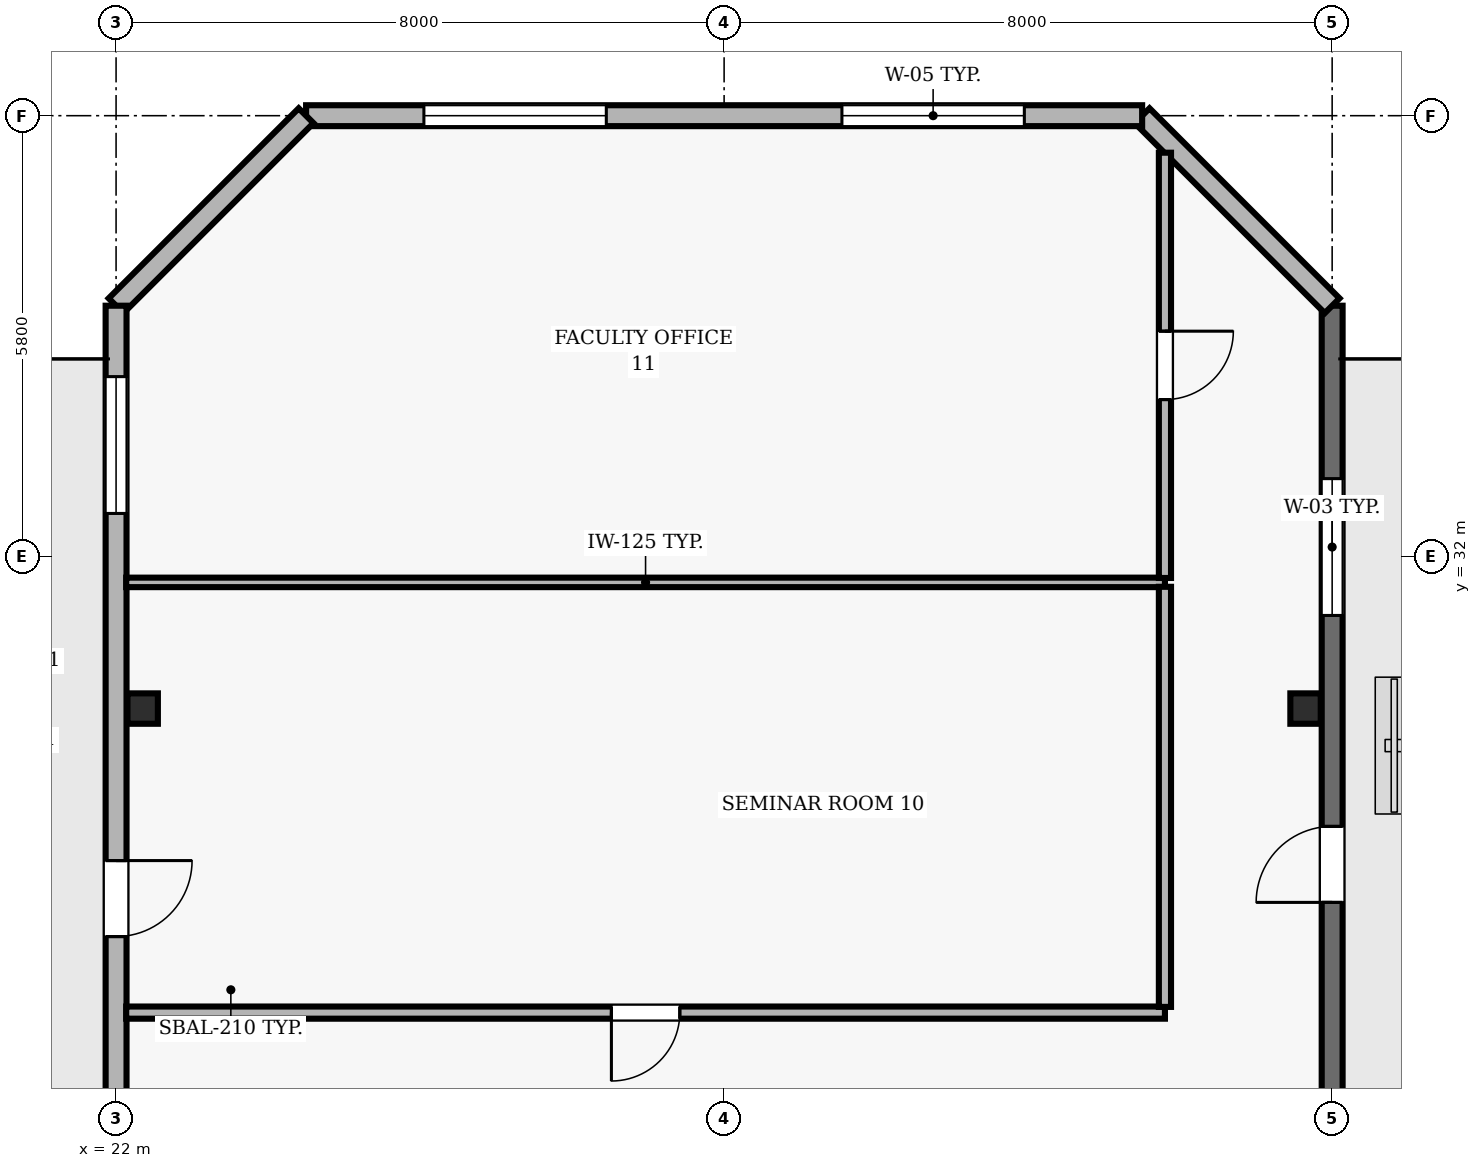
"""IFC4 building model, lengths in metres.
Left out: names, types, materials, properties, quantities, classifications, styles, units other than length and angle.
Written with IfcOpenShell. Run it as: python <this file> out.ifc"""

import sys

from ifc_helpers import new_model, si_unit, direction, frame, frame_2d, origin, origin_2d, place, context, subcontext, project, spatial, rectangle, hollow_rectangle, extrude, element, fill, save


model = new_model("IFC4")
c1 = context("Model", 3, precision=1e-05, world=origin(), true_north=direction((0.0, 1.0)))
c2 = subcontext(c1, "Body", "Model", "MODEL_VIEW")
j1 = project(units=[si_unit("LENGTHUNIT", "METRE"), si_unit("PLANEANGLEUNIT", "RADIAN")], contexts=[c1])
p1 = place(None, origin())
s1 = spatial("IfcSite", under=j1, at=p1, CompositionType="ELEMENT")
p2 = place(p1, origin())
s2 = spatial("IfcBuilding", under=s1, at=p2, CompositionType="ELEMENT")
p3 = place(p2, frame((0.0, 0.0, 271.6)))
s3 = spatial("IfcBuildingStorey", under=s2, at=p3, CompositionType="ELEMENT", Elevation=271.6)
for number, where, z_axis, x_axis in (
    (1, (22.35, 30.0, 0.0), (0.0, 0.0, 1.0), (1.0, 0.0, 0.0)),
    (2, (37.65, 30.0, 0.0), (0.0, 0.0, 1.0), (1.0, 0.0, 0.0)),
):
    element("IfcColumn", number, at=place(p3, frame(where, z_axis=z_axis, x_axis=x_axis)), inside=s3, PredefinedType="COLUMN", context=c2, shape_type="SweptSolid", body=[
        extrude(hollow_rectangle(XDim=0.4, YDim=0.4, WallThickness=0.02, at=origin_2d()), origin(), (0.0, 0.0, 1.0), 3.9),
    ])
p4 = place(p3, frame((38.0, 22.6, 0.0), z_axis=(0.0, 0.0, 1.0), x_axis=(0.0, 1.0, 0.0)))
e3 = element("IfcWall", 3, at=p4, inside=s3, PredefinedType="SOLIDWALL", context=c2, shape_type="SweptSolid", body=[
    extrude(rectangle(XDim=12.7, YDim=0.275, at=frame_2d((6.35, 0.0))), origin(), (0.0, 0.0, 1.0), 3.69),
])
p5 = place(p4, frame((4.85, 0.0, 0.0)))
e4 = element("IfcOpeningElement", 4, at=p5, cuts=e3, PredefinedType="OPENING", context=c2, shape_type="SweptSolid", body=[
    extrude(rectangle(XDim=1.0, YDim=2.2, at=frame_2d((0.5, 1.1))), frame((0.0, 0.147, 0.0), z_axis=(0.0, -1.0, 0.0), x_axis=(1.0, 0.0, 0.0)), (0.0, 0.0, 1.0), 0.295),
])
p6 = place(p4, frame((8.625, 0.0, 0.9)))
e5 = element("IfcOpeningElement", 5, at=p6, cuts=e3, PredefinedType="OPENING", context=c2, shape_type="SweptSolid", body=[
    extrude(rectangle(XDim=1.8, YDim=1.6, at=frame_2d((0.9, 0.8))), frame((0.0, 0.147, 0.0), z_axis=(0.0, -1.0, 0.0), x_axis=(1.0, 0.0, 0.0)), (0.0, 0.0, 1.0), 0.295),
])
p7 = place(p3, frame((38.0, 35.3, 0.0), z_axis=(0.0, 0.0, 1.0), x_axis=(-0.707106781187, 0.707106781187, 0.0)))
e6 = element("IfcWall", 6, at=p7, inside=s3, PredefinedType="SOLIDWALL", context=c2, shape_type="SweptSolid", body=[
    extrude(rectangle(XDim=3.536, YDim=0.275, at=frame_2d((1.768, 0.0))), origin(), (0.0, 0.0, 1.0), 3.69),
])
p8 = place(p3, frame((35.5, 37.8, 0.0), z_axis=(0.0, 0.0, 1.0), x_axis=(-1.0, 0.0, 0.0)))
e7 = element("IfcWall", 7, at=p8, inside=s3, PredefinedType="SOLIDWALL", context=c2, shape_type="SweptSolid", body=[
    extrude(rectangle(XDim=11.0, YDim=0.275, at=frame_2d((5.5, 0.0))), origin(), (0.0, 0.0, 1.0), 3.69),
])
p9 = place(p8, frame((1.55, 0.0, 0.9)))
e8 = element("IfcOpeningElement", 8, at=p9, cuts=e7, PredefinedType="OPENING", context=c2, shape_type="SweptSolid", body=[
    extrude(rectangle(XDim=2.4, YDim=1.6, at=frame_2d((1.2, 0.8))), frame((0.0, 0.147, 0.0), z_axis=(0.0, -1.0, 0.0), x_axis=(1.0, 0.0, 0.0)), (0.0, 0.0, 1.0), 0.295),
])
p10 = place(p8, frame((7.05, 0.0, 0.9)))
e9 = element("IfcOpeningElement", 9, at=p10, cuts=e7, PredefinedType="OPENING", context=c2, shape_type="SweptSolid", body=[
    extrude(rectangle(XDim=2.4, YDim=1.6, at=frame_2d((1.2, 0.8))), frame((0.0, 0.147, 0.0), z_axis=(0.0, -1.0, 0.0), x_axis=(1.0, 0.0, 0.0)), (0.0, 0.0, 1.0), 0.295),
])
p11 = place(p3, frame((24.5, 37.8, 0.0), z_axis=(0.0, 0.0, 1.0), x_axis=(-0.707106781187, -0.707106781187, 0.0)))
e10 = element("IfcWall", 10, at=p11, inside=s3, PredefinedType="SOLIDWALL", context=c2, shape_type="SweptSolid", body=[
    extrude(rectangle(XDim=3.536, YDim=0.275, at=frame_2d((1.768, 0.0))), origin(), (0.0, 0.0, 1.0), 3.69),
])
p12 = place(p3, frame((22.0, 35.3, 0.0), z_axis=(0.0, 0.0, 1.0), x_axis=(0.0, -1.0, 0.0)))
e11 = element("IfcWall", 11, at=p12, inside=s3, PredefinedType="SOLIDWALL", context=c2, shape_type="SweptSolid", body=[
    extrude(rectangle(XDim=32.8, YDim=0.275, at=frame_2d((16.4, 0.0))), origin(), (0.0, 0.0, 1.0), 3.69),
])
p13 = place(p12, frame((7.3, 0.0, 0.0)))
e12 = element("IfcOpeningElement", 12, at=p13, cuts=e11, PredefinedType="OPENING", context=c2, shape_type="SweptSolid", body=[
    extrude(rectangle(XDim=1.0, YDim=2.2, at=frame_2d((0.5, 1.1))), frame((0.0, 0.147, 0.0), z_axis=(0.0, -1.0, 0.0), x_axis=(1.0, 0.0, 0.0)), (0.0, 0.0, 1.0), 0.295),
])
p14 = place(p12, frame((0.933, 0.0, 0.9)))
e13 = element("IfcOpeningElement", 13, at=p14, cuts=e11, PredefinedType="OPENING", context=c2, shape_type="SweptSolid", body=[
    extrude(rectangle(XDim=1.8, YDim=1.8, at=frame_2d((0.9, 0.9))), frame((0.0, 0.147, 0.0), z_axis=(0.0, -1.0, 0.0), x_axis=(1.0, 0.0, 0.0)), (0.0, 0.0, 1.0), 0.295),
])
p15 = place(p12, frame((12.767, 0.0, 0.9)))
e14 = element("IfcOpeningElement", 14, at=p15, cuts=e11, PredefinedType="OPENING", context=c2, shape_type="SweptSolid", body=[
    extrude(rectangle(XDim=1.8, YDim=1.8, at=frame_2d((0.9, 0.9))), frame((0.0, 0.147, 0.0), z_axis=(0.0, -1.0, 0.0), x_axis=(1.0, 0.0, 0.0)), (0.0, 0.0, 1.0), 0.295),
])
p16 = place(p12, frame((18.233, 0.0, 0.9)))
e15 = element("IfcOpeningElement", 15, at=p16, cuts=e11, PredefinedType="OPENING", context=c2, shape_type="SweptSolid", body=[
    extrude(rectangle(XDim=1.8, YDim=1.8, at=frame_2d((0.9, 0.9))), frame((0.0, 0.147, 0.0), z_axis=(0.0, -1.0, 0.0), x_axis=(1.0, 0.0, 0.0)), (0.0, 0.0, 1.0), 0.295),
])
p17 = place(p12, frame((23.7, 0.0, 0.9)))
e16 = element("IfcOpeningElement", 16, at=p17, cuts=e11, PredefinedType="OPENING", context=c2, shape_type="SweptSolid", body=[
    extrude(rectangle(XDim=1.8, YDim=1.8, at=frame_2d((0.9, 0.9))), frame((0.0, 0.147, 0.0), z_axis=(0.0, -1.0, 0.0), x_axis=(1.0, 0.0, 0.0)), (0.0, 0.0, 1.0), 0.295),
])
p18 = place(p3, frame((35.8, 26.0, 0.0), z_axis=(0.0, 0.0, 1.0), x_axis=(-1.0, 0.0, 0.0)))
e17 = element("IfcWall", 17, at=p18, inside=s3, PredefinedType="PARTITIONING", context=c2, shape_type="SweptSolid", body=[
    extrude(rectangle(XDim=13.667, YDim=0.16, at=frame_2d((6.833, 0.0))), origin(), (0.0, 0.0, 1.0), 3.69),
])
p19 = place(p18, frame((6.383, 0.0, 0.0)))
e18 = element("IfcOpeningElement", 18, at=p19, cuts=e17, PredefinedType="OPENING", context=c2, shape_type="SweptSolid", body=[
    extrude(rectangle(XDim=0.9, YDim=2.1, at=frame_2d((0.45, 1.05))), frame((0.0, 0.09, 0.0), z_axis=(0.0, -1.0, 0.0), x_axis=(1.0, 0.0, 0.0)), (0.0, 0.0, 1.0), 0.18),
])
p20 = place(p3, frame((35.8, 31.66, 0.0), z_axis=(0.0, 0.0, 1.0), x_axis=(-1.0, 0.0, 0.0)))
e19 = element("IfcWall", 19, at=p20, inside=s3, PredefinedType="PARTITIONING", context=c2, shape_type="SweptSolid", body=[
    extrude(rectangle(XDim=13.667, YDim=0.125, at=frame_2d((6.833, 0.0))), origin(), (0.0, 0.0, 1.0), 3.69),
])
p21 = place(p3, frame((35.8, 31.602, 0.0), z_axis=(0.0, 0.0, 1.0), x_axis=(0.0, -1.0, 0.0)))
e20 = element("IfcWall", 20, at=p21, inside=s3, PredefinedType="PARTITIONING", context=c2, shape_type="SweptSolid", body=[
    extrude(rectangle(XDim=5.527, YDim=0.16, at=frame_2d((2.764, 0.0))), origin(), (0.0, 0.0, 1.0), 3.69),
])
p22 = place(p3, frame((35.8, 37.313, 0.0), z_axis=(0.0, 0.0, 1.0), x_axis=(0.0, -1.0, 0.0)))
e21 = element("IfcWall", 21, at=p22, inside=s3, PredefinedType="PARTITIONING", context=c2, shape_type="SweptSolid", body=[
    extrude(rectangle(XDim=5.595, YDim=0.16, at=frame_2d((2.797, 0.0))), origin(), (0.0, 0.0, 1.0), 3.69),
])
p23 = place(p22, frame((2.348, 0.0, 0.0)))
e22 = element("IfcOpeningElement", 22, at=p23, cuts=e21, PredefinedType="OPENING", context=c2, shape_type="SweptSolid", body=[
    extrude(rectangle(XDim=0.9, YDim=2.1, at=frame_2d((0.45, 1.05))), frame((0.0, 0.09, 0.0), z_axis=(0.0, -1.0, 0.0), x_axis=(1.0, 0.0, 0.0)), (0.0, 0.0, 1.0), 0.18),
])
p24 = place(p5, origin())
e23 = element("IfcDoor", 23, at=p24, inside=s3, OperationType="SINGLE_SWING_LEFT", PredefinedType="DOOR", context=c2, shape_type="SweptSolid", body=[
    extrude(rectangle(XDim=1.0, YDim=2.2, at=frame_2d((0.5, 1.1))), frame((0.0, 0.025, 0.0), z_axis=(0.0, -1.0, 0.0), x_axis=(1.0, 0.0, 0.0)), (0.0, 0.0, 1.0), 0.05),
])
fill(e4, e23)
p25 = place(p6, origin())
e24 = element("IfcWindow", 24, at=p25, inside=s3, PartitioningType="SINGLE_PANEL", PredefinedType="WINDOW", context=c2, shape_type="SweptSolid", body=[
    extrude(rectangle(XDim=1.8, YDim=1.6, at=frame_2d((0.9, 0.8))), frame((0.0, 0.03, 0.0), z_axis=(0.0, -1.0, 0.0), x_axis=(1.0, 0.0, 0.0)), (0.0, 0.0, 1.0), 0.06),
])
fill(e5, e24)
p26 = place(p9, origin())
e25 = element("IfcWindow", 25, at=p26, inside=s3, PartitioningType="SINGLE_PANEL", PredefinedType="WINDOW", context=c2, shape_type="SweptSolid", body=[
    extrude(rectangle(XDim=2.4, YDim=1.6, at=frame_2d((1.2, 0.8))), frame((0.0, 0.03, 0.0), z_axis=(0.0, -1.0, 0.0), x_axis=(1.0, 0.0, 0.0)), (0.0, 0.0, 1.0), 0.06),
])
fill(e8, e25)
p27 = place(p10, origin())
e26 = element("IfcWindow", 26, at=p27, inside=s3, PartitioningType="SINGLE_PANEL", PredefinedType="WINDOW", context=c2, shape_type="SweptSolid", body=[
    extrude(rectangle(XDim=2.4, YDim=1.6, at=frame_2d((1.2, 0.8))), frame((0.0, 0.03, 0.0), z_axis=(0.0, -1.0, 0.0), x_axis=(1.0, 0.0, 0.0)), (0.0, 0.0, 1.0), 0.06),
])
fill(e9, e26)
p28 = place(p13, origin())
e27 = element("IfcDoor", 27, at=p28, inside=s3, OperationType="SINGLE_SWING_LEFT", PredefinedType="DOOR", context=c2, shape_type="SweptSolid", body=[
    extrude(rectangle(XDim=1.0, YDim=2.2, at=frame_2d((0.5, 1.1))), frame((0.0, 0.025, 0.0), z_axis=(0.0, -1.0, 0.0), x_axis=(1.0, 0.0, 0.0)), (0.0, 0.0, 1.0), 0.05),
])
fill(e12, e27)
p29 = place(p14, origin())
e28 = element("IfcWindow", 28, at=p29, inside=s3, PartitioningType="SINGLE_PANEL", PredefinedType="WINDOW", context=c2, shape_type="SweptSolid", body=[
    extrude(rectangle(XDim=1.8, YDim=1.8, at=frame_2d((0.9, 0.9))), frame((0.0, 0.03, 0.0), z_axis=(0.0, -1.0, 0.0), x_axis=(1.0, 0.0, 0.0)), (0.0, 0.0, 1.0), 0.06),
])
fill(e13, e28)
p30 = place(p19, origin())
e29 = element("IfcDoor", 29, at=p30, inside=s3, OperationType="SINGLE_SWING_RIGHT", PredefinedType="DOOR", context=c2, shape_type="SweptSolid", body=[
    extrude(rectangle(XDim=0.9, YDim=2.1, at=frame_2d((0.45, 1.05))), frame((0.0, 0.025, 0.0), z_axis=(0.0, -1.0, 0.0), x_axis=(1.0, 0.0, 0.0)), (0.0, 0.0, 1.0), 0.05),
])
fill(e18, e29)
p31 = place(p23, origin())
e30 = element("IfcDoor", 30, at=p31, inside=s3, OperationType="SINGLE_SWING_LEFT", PredefinedType="DOOR", context=c2, shape_type="SweptSolid", body=[
    extrude(rectangle(XDim=0.9, YDim=2.1, at=frame_2d((0.45, 1.05))), frame((0.0, 0.025, 0.0), z_axis=(0.0, -1.0, 0.0), x_axis=(1.0, 0.0, 0.0)), (0.0, 0.0, 1.0), 0.05),
])
fill(e22, e30)
save(model, sys.argv[1])
